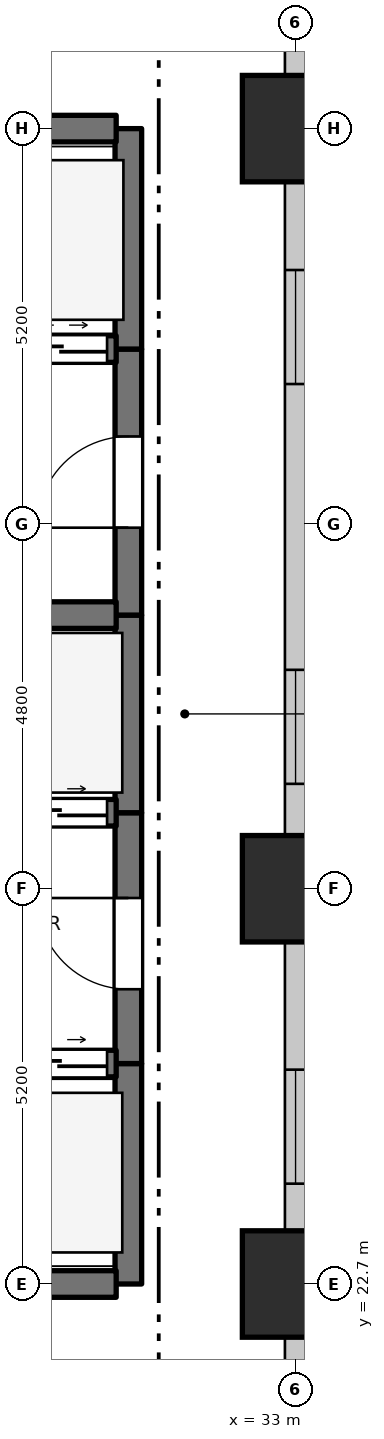
"""IFC4 building model, lengths in metres.
Left out: names, types, materials, properties, quantities, classifications, styles, units other than length and angle.
Written with IfcOpenShell. Run it as: python <this file> out.ifc"""

import sys

from ifc_helpers import new_model, si_unit, direction, frame, frame_2d, origin, origin_2d, place, context, subcontext, project, spatial, rectangle, extrude, element, fill, save


model = new_model("IFC4")
c1 = context("Model", 3, precision=1e-05, world=origin(), true_north=direction((0.0, 1.0)))
c2 = subcontext(c1, "Body", "Model", "MODEL_VIEW")
j1 = project(units=[si_unit("LENGTHUNIT", "METRE"), si_unit("PLANEANGLEUNIT", "RADIAN")], contexts=[c1])
p1 = place(None, origin())
s1 = spatial("IfcSite", under=j1, at=p1, CompositionType="ELEMENT")
p2 = place(p1, origin())
s2 = spatial("IfcBuilding", under=s1, at=p2, CompositionType="ELEMENT")
p3 = place(p2, frame((0.0, 0.0, 13.0)))
s3 = spatial("IfcBuildingStorey", under=s2, at=p3, CompositionType="ELEMENT", Elevation=13.0)
for number, where, z_axis, x_axis in (
    (1, (33.0, 22.7, 0.0), (0.0, 0.0, 1.0), (1.0, 0.0, 0.0)),
    (2, (33.0, 27.9, 0.0), (0.0, 0.0, 1.0), (1.0, 0.0, 0.0)),
    (3, (33.0, 37.9, 0.0), (0.0, 0.0, 1.0), (1.0, 0.0, 0.0)),
):
    element("IfcColumn", number, at=place(p3, frame(where, z_axis=z_axis, x_axis=x_axis)), inside=s3, PredefinedType="PILASTER", context=c2, shape_type="SweptSolid", body=[
        extrude(rectangle(XDim=1.4, YDim=1.4, at=origin_2d()), origin(), (0.0, 0.0, 1.0), 6.0),
    ])
p4 = place(p3, frame((33.0, 54.1, 0.0), z_axis=(0.0, 0.0, 1.0), x_axis=(0.0, -1.0, 0.0)))
e4 = element("IfcWall", 4, at=p4, inside=s3, PredefinedType="STANDARD", context=c2, shape_type="SweptSolid", body=[
    extrude(rectangle(XDim=16.2, YDim=0.28, at=frame_2d((8.1, 0.0))), origin(), (0.0, 0.0, 1.0), 4.98),
])
p5 = place(p4, frame((2.28, 0.0, 0.95)))
e5 = element("IfcOpeningElement", 5, at=p5, cuts=e4, PredefinedType="OPENING", context=c2, shape_type="SweptSolid", body=[
    extrude(rectangle(XDim=1.5, YDim=1.8, at=frame_2d((0.75, 0.9))), frame((0.0, 0.15, 0.0), z_axis=(0.0, -1.0, 0.0), x_axis=(1.0, 0.0, 0.0)), (0.0, 0.0, 1.0), 0.3),
])
p6 = place(p4, frame((7.54, 0.0, 0.95)))
e6 = element("IfcOpeningElement", 6, at=p6, cuts=e4, PredefinedType="OPENING", context=c2, shape_type="SweptSolid", body=[
    extrude(rectangle(XDim=1.5, YDim=1.8, at=frame_2d((0.75, 0.9))), frame((0.0, 0.15, 0.0), z_axis=(0.0, -1.0, 0.0), x_axis=(1.0, 0.0, 0.0)), (0.0, 0.0, 1.0), 0.3),
])
p7 = place(p4, frame((12.8, 0.0, 0.95)))
e7 = element("IfcOpeningElement", 7, at=p7, cuts=e4, PredefinedType="OPENING", context=c2, shape_type="SweptSolid", body=[
    extrude(rectangle(XDim=1.5, YDim=1.8, at=frame_2d((0.75, 0.9))), frame((0.0, 0.15, 0.0), z_axis=(0.0, -1.0, 0.0), x_axis=(1.0, 0.0, 0.0)), (0.0, 0.0, 1.0), 0.3),
])
p8 = place(p3, frame((30.8, 22.7, 0.0), z_axis=(0.0, 0.0, 1.0), x_axis=(0.0, 1.0, 0.0)))
e8 = element("IfcWall", 8, at=p8, inside=s3, PredefinedType="SHEAR", context=c2, shape_type="SweptSolid", body=[
    extrude(rectangle(XDim=2.9, YDim=0.35, at=frame_2d((1.45, 0.0))), origin(), (0.0, 0.0, 1.0), 5.58),
])
p9 = place(p3, frame((30.8, 25.6, 0.0), z_axis=(0.0, 0.0, 1.0), x_axis=(0.0, 1.0, 0.0)))
e9 = element("IfcWall", 9, at=p9, inside=s3, PredefinedType="SHEAR", context=c2, shape_type="SweptSolid", body=[
    extrude(rectangle(XDim=3.3, YDim=0.35, at=frame_2d((1.65, 0.0))), origin(), (0.0, 0.0, 1.0), 5.58),
])
p10 = place(p9, frame((0.978, 0.0, 0.0)))
e10 = element("IfcOpeningElement", 10, at=p10, cuts=e9, PredefinedType="OPENING", context=c2, shape_type="SweptSolid", body=[
    extrude(rectangle(XDim=1.2, YDim=2.2, at=frame_2d((0.6, 1.1))), frame((0.0, 0.185, 0.0), z_axis=(0.0, -1.0, 0.0), x_axis=(1.0, 0.0, 0.0)), (0.0, 0.0, 1.0), 0.37),
])
p11 = place(p3, frame((30.8, 28.9, 0.0), z_axis=(0.0, 0.0, 1.0), x_axis=(0.0, 1.0, 0.0)))
e11 = element("IfcWall", 11, at=p11, inside=s3, PredefinedType="SHEAR", context=c2, shape_type="SweptSolid", body=[
    extrude(rectangle(XDim=2.6, YDim=0.35, at=frame_2d((1.3, 0.0))), origin(), (0.0, 0.0, 1.0), 5.58),
])
p12 = place(p3, frame((30.8, 31.5, 0.0), z_axis=(0.0, 0.0, 1.0), x_axis=(0.0, 1.0, 0.0)))
e12 = element("IfcWall", 12, at=p12, inside=s3, PredefinedType="SHEAR", context=c2, shape_type="SweptSolid", body=[
    extrude(rectangle(XDim=3.5, YDim=0.35, at=frame_2d((1.75, 0.0))), origin(), (0.0, 0.0, 1.0), 5.58),
])
p13 = place(p12, frame((1.15, 0.0, 0.0)))
e13 = element("IfcOpeningElement", 13, at=p13, cuts=e12, PredefinedType="OPENING", context=c2, shape_type="SweptSolid", body=[
    extrude(rectangle(XDim=1.2, YDim=2.2, at=frame_2d((0.6, 1.1))), frame((0.0, 0.185, 0.0), z_axis=(0.0, -1.0, 0.0), x_axis=(1.0, 0.0, 0.0)), (0.0, 0.0, 1.0), 0.37),
])
p14 = place(p3, frame((30.8, 35.0, 0.0), z_axis=(0.0, 0.0, 1.0), x_axis=(0.0, 1.0, 0.0)))
e14 = element("IfcWall", 14, at=p14, inside=s3, PredefinedType="SHEAR", context=c2, shape_type="SweptSolid", body=[
    extrude(rectangle(XDim=2.9, YDim=0.35, at=frame_2d((1.45, 0.0))), origin(), (0.0, 0.0, 1.0), 5.58),
])
p15 = place(p3, frame((27.46, 22.7, 0.0), z_axis=(0.0, 0.0, 1.0), x_axis=(1.0, 0.0, 0.0)))
e15 = element("IfcWall", 15, at=p15, inside=s3, PredefinedType="SHEAR", context=c2, shape_type="SweptSolid", body=[
    extrude(rectangle(XDim=3.18, YDim=0.35, at=frame_2d((1.59, 0.0))), origin(), (0.0, 0.0, 1.0), 5.58),
])
p16 = place(p3, frame((27.46, 25.6, 0.0), z_axis=(0.0, 0.0, 1.0), x_axis=(1.0, 0.0, 0.0)))
e16 = element("IfcWall", 16, at=p16, inside=s3, PredefinedType="SHEAR", context=c2, shape_type="SweptSolid", body=[
    extrude(rectangle(XDim=3.18, YDim=0.35, at=frame_2d((1.59, 0.0))), origin(), (0.0, 0.0, 1.0), 5.58),
])
p17 = place(p16, frame((0.12, 0.0, 0.0)))
e17 = element("IfcOpeningElement", 17, at=p17, cuts=e16, PredefinedType="OPENING", context=c2, shape_type="SweptSolid", body=[
    extrude(rectangle(XDim=1.25, YDim=2.2, at=frame_2d((0.625, 1.1))), frame((0.0, 0.185, 0.0), z_axis=(0.0, -1.0, 0.0), x_axis=(1.0, 0.0, 0.0)), (0.0, 0.0, 1.0), 0.37),
])
p18 = place(p16, frame((1.81, 0.0, 0.0)))
e18 = element("IfcOpeningElement", 18, at=p18, cuts=e16, PredefinedType="OPENING", context=c2, shape_type="SweptSolid", body=[
    extrude(rectangle(XDim=1.25, YDim=2.2, at=frame_2d((0.625, 1.1))), frame((0.0, 0.185, 0.0), z_axis=(0.0, -1.0, 0.0), x_axis=(1.0, 0.0, 0.0)), (0.0, 0.0, 1.0), 0.37),
])
p19 = place(p3, frame((27.46, 28.9, 0.0), z_axis=(0.0, 0.0, 1.0), x_axis=(1.0, 0.0, 0.0)))
e19 = element("IfcWall", 19, at=p19, inside=s3, PredefinedType="SHEAR", context=c2, shape_type="SweptSolid", body=[
    extrude(rectangle(XDim=3.18, YDim=0.35, at=frame_2d((1.59, 0.0))), origin(), (0.0, 0.0, 1.0), 5.58),
])
p20 = place(p19, frame((0.12, 0.0, 0.0)))
e20 = element("IfcOpeningElement", 20, at=p20, cuts=e19, PredefinedType="OPENING", context=c2, shape_type="SweptSolid", body=[
    extrude(rectangle(XDim=1.25, YDim=2.2, at=frame_2d((0.625, 1.1))), frame((0.0, 0.185, 0.0), z_axis=(0.0, -1.0, 0.0), x_axis=(1.0, 0.0, 0.0)), (0.0, 0.0, 1.0), 0.37),
])
p21 = place(p19, frame((1.81, 0.0, 0.0)))
e21 = element("IfcOpeningElement", 21, at=p21, cuts=e19, PredefinedType="OPENING", context=c2, shape_type="SweptSolid", body=[
    extrude(rectangle(XDim=1.25, YDim=2.2, at=frame_2d((0.625, 1.1))), frame((0.0, 0.185, 0.0), z_axis=(0.0, -1.0, 0.0), x_axis=(1.0, 0.0, 0.0)), (0.0, 0.0, 1.0), 0.37),
])
p22 = place(p3, frame((27.46, 31.5, 0.0), z_axis=(0.0, 0.0, 1.0), x_axis=(1.0, 0.0, 0.0)))
e22 = element("IfcWall", 22, at=p22, inside=s3, PredefinedType="SHEAR", context=c2, shape_type="SweptSolid", body=[
    extrude(rectangle(XDim=3.18, YDim=0.35, at=frame_2d((1.59, 0.0))), origin(), (0.0, 0.0, 1.0), 5.58),
])
p23 = place(p3, frame((19.16, 35.0, 0.0), z_axis=(0.0, 0.0, 1.0), x_axis=(1.0, 0.0, 0.0)))
e23 = element("IfcWall", 23, at=p23, inside=s3, PredefinedType="SHEAR", context=c2, shape_type="SweptSolid", body=[
    extrude(rectangle(XDim=11.48, YDim=0.35, at=frame_2d((5.74, 0.0))), origin(), (0.0, 0.0, 1.0), 5.58),
])
p24 = place(p23, frame((0.365, 0.0, 0.0)))
e24 = element("IfcOpeningElement", 24, at=p24, cuts=e23, PredefinedType="OPENING", context=c2, shape_type="SweptSolid", body=[
    extrude(rectangle(XDim=1.35, YDim=2.2, at=frame_2d((0.675, 1.1))), frame((0.0, 0.185, 0.0), z_axis=(0.0, -1.0, 0.0), x_axis=(1.0, 0.0, 0.0)), (0.0, 0.0, 1.0), 0.37),
])
p25 = place(p23, frame((2.765, 0.0, 0.0)))
e25 = element("IfcOpeningElement", 25, at=p25, cuts=e23, PredefinedType="OPENING", context=c2, shape_type="SweptSolid", body=[
    extrude(rectangle(XDim=1.35, YDim=2.2, at=frame_2d((0.675, 1.1))), frame((0.0, 0.185, 0.0), z_axis=(0.0, -1.0, 0.0), x_axis=(1.0, 0.0, 0.0)), (0.0, 0.0, 1.0), 0.37),
])
p26 = place(p23, frame((4.915, 0.0, 0.0)))
e26 = element("IfcOpeningElement", 26, at=p26, cuts=e23, PredefinedType="OPENING", context=c2, shape_type="SweptSolid", body=[
    extrude(rectangle(XDim=1.2, YDim=2.2, at=frame_2d((0.6, 1.1))), frame((0.0, 0.185, 0.0), z_axis=(0.0, -1.0, 0.0), x_axis=(1.0, 0.0, 0.0)), (0.0, 0.0, 1.0), 0.37),
])
p27 = place(p23, frame((6.665, 0.0, 0.0)))
e27 = element("IfcOpeningElement", 27, at=p27, cuts=e23, PredefinedType="OPENING", context=c2, shape_type="SweptSolid", body=[
    extrude(rectangle(XDim=1.2, YDim=2.2, at=frame_2d((0.6, 1.1))), frame((0.0, 0.185, 0.0), z_axis=(0.0, -1.0, 0.0), x_axis=(1.0, 0.0, 0.0)), (0.0, 0.0, 1.0), 0.37),
])
p28 = place(p23, frame((8.415, 0.0, 0.0)))
e28 = element("IfcOpeningElement", 28, at=p28, cuts=e23, PredefinedType="OPENING", context=c2, shape_type="SweptSolid", body=[
    extrude(rectangle(XDim=1.2, YDim=2.2, at=frame_2d((0.6, 1.1))), frame((0.0, 0.185, 0.0), z_axis=(0.0, -1.0, 0.0), x_axis=(1.0, 0.0, 0.0)), (0.0, 0.0, 1.0), 0.37),
])
p29 = place(p23, frame((10.16, 0.0, 0.0)))
e29 = element("IfcOpeningElement", 29, at=p29, cuts=e23, PredefinedType="OPENING", context=c2, shape_type="SweptSolid", body=[
    extrude(rectangle(XDim=1.2, YDim=2.2, at=frame_2d((0.6, 1.1))), frame((0.0, 0.185, 0.0), z_axis=(0.0, -1.0, 0.0), x_axis=(1.0, 0.0, 0.0)), (0.0, 0.0, 1.0), 0.37),
])
p30 = place(p3, frame((19.16, 37.9, 0.0), z_axis=(0.0, 0.0, 1.0), x_axis=(1.0, 0.0, 0.0)))
e30 = element("IfcWall", 30, at=p30, inside=s3, PredefinedType="SHEAR", context=c2, shape_type="SweptSolid", body=[
    extrude(rectangle(XDim=11.48, YDim=0.35, at=frame_2d((5.74, 0.0))), origin(), (0.0, 0.0, 1.0), 5.58),
])
p31 = place(p3, frame((33.0, 37.9, 0.0), z_axis=(0.0, 0.0, 1.0), x_axis=(0.0, -1.0, 0.0)))
e31 = element("IfcWall", 31, at=p31, inside=s3, PredefinedType="STANDARD", context=c2, shape_type="SweptSolid", body=[
    extrude(rectangle(XDim=37.2, YDim=0.28, at=frame_2d((18.6, 0.0))), origin(), (0.0, 0.0, 1.0), 5.08),
])
p32 = place(p31, frame((1.86, 0.0, 0.95)))
e32 = element("IfcOpeningElement", 32, at=p32, cuts=e31, PredefinedType="OPENING", context=c2, shape_type="SweptSolid", body=[
    extrude(rectangle(XDim=1.5, YDim=1.8, at=frame_2d((0.75, 0.9))), frame((0.0, 0.15, 0.0), z_axis=(0.0, -1.0, 0.0), x_axis=(1.0, 0.0, 0.0)), (0.0, 0.0, 1.0), 0.3),
])
p33 = place(p31, frame((7.12, 0.0, 0.95)))
e33 = element("IfcOpeningElement", 33, at=p33, cuts=e31, PredefinedType="OPENING", context=c2, shape_type="SweptSolid", body=[
    extrude(rectangle(XDim=1.5, YDim=1.8, at=frame_2d((0.75, 0.9))), frame((0.0, 0.15, 0.0), z_axis=(0.0, -1.0, 0.0), x_axis=(1.0, 0.0, 0.0)), (0.0, 0.0, 1.0), 0.3),
])
p34 = place(p31, frame((12.38, 0.0, 0.95)))
e34 = element("IfcOpeningElement", 34, at=p34, cuts=e31, PredefinedType="OPENING", context=c2, shape_type="SweptSolid", body=[
    extrude(rectangle(XDim=1.5, YDim=1.8, at=frame_2d((0.75, 0.9))), frame((0.0, 0.15, 0.0), z_axis=(0.0, -1.0, 0.0), x_axis=(1.0, 0.0, 0.0)), (0.0, 0.0, 1.0), 0.3),
])
p35 = place(p31, frame((17.19, 0.0, 0.95)))
e35 = element("IfcOpeningElement", 35, at=p35, cuts=e31, PredefinedType="OPENING", context=c2, shape_type="SweptSolid", body=[
    extrude(rectangle(XDim=1.5, YDim=1.8, at=frame_2d((0.75, 0.9))), frame((0.0, 0.15, 0.0), z_axis=(0.0, -1.0, 0.0), x_axis=(1.0, 0.0, 0.0)), (0.0, 0.0, 1.0), 0.3),
])
p36 = place(p31, frame((22.45, 0.0, 0.95)))
e36 = element("IfcOpeningElement", 36, at=p36, cuts=e31, PredefinedType="OPENING", context=c2, shape_type="SweptSolid", body=[
    extrude(rectangle(XDim=1.5, YDim=1.8, at=frame_2d((0.75, 0.9))), frame((0.0, 0.15, 0.0), z_axis=(0.0, -1.0, 0.0), x_axis=(1.0, 0.0, 0.0)), (0.0, 0.0, 1.0), 0.3),
])
p37 = place(p31, frame((28.16, 0.0, 0.95)))
e37 = element("IfcOpeningElement", 37, at=p37, cuts=e31, PredefinedType="OPENING", context=c2, shape_type="SweptSolid", body=[
    extrude(rectangle(XDim=1.5, YDim=1.8, at=frame_2d((0.75, 0.9))), frame((0.0, 0.15, 0.0), z_axis=(0.0, -1.0, 0.0), x_axis=(1.0, 0.0, 0.0)), (0.0, 0.0, 1.0), 0.3),
])
p38 = place(p31, frame((33.42, 0.0, 0.95)))
e38 = element("IfcOpeningElement", 38, at=p38, cuts=e31, PredefinedType="OPENING", context=c2, shape_type="SweptSolid", body=[
    extrude(rectangle(XDim=1.5, YDim=1.8, at=frame_2d((0.75, 0.9))), frame((0.0, 0.15, 0.0), z_axis=(0.0, -1.0, 0.0), x_axis=(1.0, 0.0, 0.0)), (0.0, 0.0, 1.0), 0.3),
])
p39 = place(p32, origin())
e39 = element("IfcWindow", 39, at=p39, inside=s3, PartitioningType="SINGLE_PANEL", PredefinedType="WINDOW", context=c2, shape_type="SweptSolid", body=[
    extrude(rectangle(XDim=1.5, YDim=1.8, at=frame_2d((0.75, 0.9))), frame((0.0, 0.03, 0.0), z_axis=(0.0, -1.0, 0.0), x_axis=(1.0, 0.0, 0.0)), (0.0, 0.0, 1.0), 0.06),
])
fill(e32, e39)
p40 = place(p33, origin())
e40 = element("IfcWindow", 40, at=p40, inside=s3, PartitioningType="SINGLE_PANEL", PredefinedType="WINDOW", context=c2, shape_type="SweptSolid", body=[
    extrude(rectangle(XDim=1.5, YDim=1.8, at=frame_2d((0.75, 0.9))), frame((0.0, 0.03, 0.0), z_axis=(0.0, -1.0, 0.0), x_axis=(1.0, 0.0, 0.0)), (0.0, 0.0, 1.0), 0.06),
])
fill(e33, e40)
p41 = place(p34, origin())
e41 = element("IfcWindow", 41, at=p41, inside=s3, PartitioningType="SINGLE_PANEL", PredefinedType="WINDOW", context=c2, shape_type="SweptSolid", body=[
    extrude(rectangle(XDim=1.5, YDim=1.8, at=frame_2d((0.75, 0.9))), frame((0.0, 0.03, 0.0), z_axis=(0.0, -1.0, 0.0), x_axis=(1.0, 0.0, 0.0)), (0.0, 0.0, 1.0), 0.06),
])
fill(e34, e41)
p42 = place(p10, origin())
e42 = element("IfcDoor", 42, at=p42, inside=s3, OperationType="SINGLE_SWING_RIGHT", PredefinedType="DOOR", context=c2, shape_type="SweptSolid", body=[
    extrude(rectangle(XDim=1.2, YDim=2.2, at=frame_2d((0.6, 1.1))), frame((0.0, 0.025, 0.0), z_axis=(0.0, -1.0, 0.0), x_axis=(1.0, 0.0, 0.0)), (0.0, 0.0, 1.0), 0.05),
])
fill(e10, e42)
p43 = place(p13, origin())
e43 = element("IfcDoor", 43, at=p43, inside=s3, OperationType="SINGLE_SWING_LEFT", PredefinedType="DOOR", context=c2, shape_type="SweptSolid", body=[
    extrude(rectangle(XDim=1.2, YDim=2.2, at=frame_2d((0.6, 1.1))), frame((0.0, 0.025, 0.0), z_axis=(0.0, -1.0, 0.0), x_axis=(1.0, 0.0, 0.0)), (0.0, 0.0, 1.0), 0.05),
])
fill(e13, e43)
p44 = place(p18, origin())
e44 = element("IfcDoor", 44, at=p44, inside=s3, OperationType="DOUBLE_DOOR_SLIDING", PredefinedType="DOOR", context=c2, shape_type="SweptSolid", body=[
    extrude(rectangle(XDim=1.25, YDim=2.2, at=frame_2d((0.625, 1.1))), frame((0.0, 0.025, 0.0), z_axis=(0.0, -1.0, 0.0), x_axis=(1.0, 0.0, 0.0)), (0.0, 0.0, 1.0), 0.05),
])
fill(e18, e44)
p45 = place(p21, origin())
e45 = element("IfcDoor", 45, at=p45, inside=s3, OperationType="DOUBLE_DOOR_SLIDING", PredefinedType="DOOR", context=c2, shape_type="SweptSolid", body=[
    extrude(rectangle(XDim=1.25, YDim=2.2, at=frame_2d((0.625, 1.1))), frame((0.0, 0.025, 0.0), z_axis=(0.0, -1.0, 0.0), x_axis=(1.0, 0.0, 0.0)), (0.0, 0.0, 1.0), 0.05),
])
fill(e21, e45)
p46 = place(p29, origin())
e46 = element("IfcDoor", 46, at=p46, inside=s3, OperationType="DOUBLE_DOOR_SLIDING", PredefinedType="DOOR", context=c2, shape_type="SweptSolid", body=[
    extrude(rectangle(XDim=1.2, YDim=2.2, at=frame_2d((0.6, 1.1))), frame((0.0, 0.025, 0.0), z_axis=(0.0, -1.0, 0.0), x_axis=(1.0, 0.0, 0.0)), (0.0, 0.0, 1.0), 0.05),
])
fill(e29, e46)
save(model, sys.argv[1])
